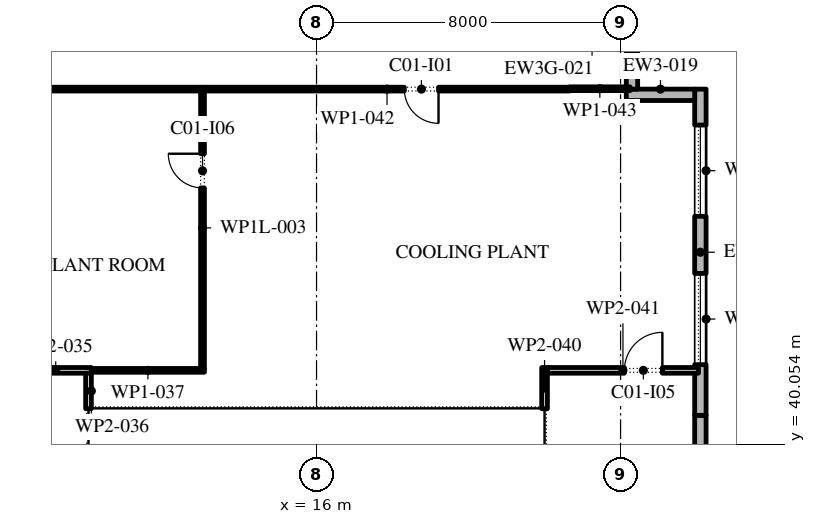
"""IFC4 building model, lengths in metres.
Left out: names, types, materials, properties, quantities, classifications, styles, units other than length and angle.
Written with IfcOpenShell. Run it as: python <this file> out.ifc"""

import sys

from ifc_helpers import new_model, si_unit, direction, frame, frame_2d, origin, place, context, subcontext, project, spatial, polyline, rectangle, outline, extrude, element, fill, save


model = new_model("IFC4")
c1 = context("Model", 3, precision=1e-05, world=origin(), true_north=direction((0.0, 1.0)))
c2 = subcontext(c1, "Body", "Model", "MODEL_VIEW")
j1 = project(units=[si_unit("LENGTHUNIT", "METRE"), si_unit("PLANEANGLEUNIT", "RADIAN")], contexts=[c1])
p1 = place(None, origin())
s1 = spatial("IfcSite", under=j1, at=p1, CompositionType="ELEMENT")
p2 = place(p1, origin())
s2 = spatial("IfcBuilding", under=s1, at=p2, CompositionType="ELEMENT")
p3 = place(p2, frame((0.0, 0.0, 369.0)))
s3 = spatial("IfcBuildingStorey", under=s2, at=p3, CompositionType="ELEMENT", Elevation=369.0)
p4 = place(p3, frame((26.1, 32.233, 0.0), z_axis=(0.0, 0.0, 1.0), x_axis=(0.0, 1.0, 0.0)))
e1 = element("IfcWall", 1, at=p4, inside=s3, PredefinedType="STANDARD", context=c2, shape_type="SweptSolid", body=[
    extrude(rectangle(XDim=8.583, YDim=0.3, at=frame_2d((4.292, 0.0))), origin(), (0.0, 0.0, 1.0), 4.0),
])
p5 = place(p4, frame((0.946, 0.0, 0.8)))
e2 = element("IfcOpeningElement", 2, at=p5, cuts=e1, PredefinedType="OPENING", context=c2, shape_type="SweptSolid", body=[
    extrude(outline(polyline([(0.0, 0.0), (2.4, 0.0), (2.4, 1.25), (2.377, 1.488), (2.31, 1.717), (2.2, 1.929), (2.051, 2.116), (1.87, 2.272), (1.663, 2.391), (1.437, 2.468), (1.2, 2.5), (0.963, 2.468), (0.737, 2.391), (0.53, 2.272), (0.349, 2.116), (0.2, 1.929), (0.09, 1.717), (0.023, 1.488), (0.0, 1.25), (0.0, 0.0)])), frame((0.0, 0.16, 0.0), z_axis=(0.0, -1.0, 0.0), x_axis=(1.0, 0.0, 0.0)), (0.0, 0.0, 1.0), 0.32),
])
p6 = place(p4, frame((5.238, 0.0, 0.8)))
e3 = element("IfcOpeningElement", 3, at=p6, cuts=e1, PredefinedType="OPENING", context=c2, shape_type="SweptSolid", body=[
    extrude(outline(polyline([(0.0, 0.0), (2.4, 0.0), (2.4, 1.25), (2.377, 1.488), (2.31, 1.717), (2.2, 1.929), (2.051, 2.116), (1.87, 2.272), (1.663, 2.391), (1.437, 2.468), (1.2, 2.5), (0.963, 2.468), (0.737, 2.391), (0.53, 2.272), (0.349, 2.116), (0.2, 1.929), (0.09, 1.717), (0.023, 1.488), (0.0, 1.25), (0.0, 0.0)])), frame((0.0, 0.16, 0.0), z_axis=(0.0, -1.0, 0.0), x_axis=(1.0, 0.0, 0.0)), (0.0, 0.0, 1.0), 0.32),
])
p7 = place(p3, frame((26.1, 40.817, 0.0), z_axis=(0.0, 0.0, 1.0), x_axis=(0.0, 1.0, 0.0)))
e4 = element("IfcWall", 4, at=p7, inside=s3, PredefinedType="STANDARD", context=c2, shape_type="SweptSolid", body=[
    extrude(rectangle(XDim=8.583, YDim=0.3, at=frame_2d((4.292, 0.0))), origin(), (0.0, 0.0, 1.0), 4.0),
])
p8 = place(p7, frame((1.333, 0.0, 0.8)))
e5 = element("IfcOpeningElement", 5, at=p8, cuts=e4, PredefinedType="OPENING", context=c2, shape_type="SweptSolid", body=[
    extrude(outline(polyline([(0.0, 0.0), (2.4, 0.0), (2.4, 1.25), (2.377, 1.488), (2.31, 1.717), (2.2, 1.929), (2.051, 2.116), (1.87, 2.272), (1.663, 2.391), (1.437, 2.468), (1.2, 2.5), (0.963, 2.468), (0.737, 2.391), (0.53, 2.272), (0.349, 2.116), (0.2, 1.929), (0.09, 1.717), (0.023, 1.488), (0.0, 1.25), (0.0, 0.0)])), frame((0.0, 0.16, 0.0), z_axis=(0.0, -1.0, 0.0), x_axis=(1.0, 0.0, 0.0)), (0.0, 0.0, 1.0), 0.32),
])
p9 = place(p7, frame((5.238, 0.0, 0.8)))
e6 = element("IfcOpeningElement", 6, at=p9, cuts=e4, PredefinedType="OPENING", context=c2, shape_type="SweptSolid", body=[
    extrude(outline(polyline([(0.0, 0.0), (2.4, 0.0), (2.4, 1.25), (2.377, 1.488), (2.31, 1.717), (2.2, 1.929), (2.051, 2.116), (1.87, 2.272), (1.663, 2.391), (1.437, 2.468), (1.2, 2.5), (0.963, 2.468), (0.737, 2.391), (0.53, 2.272), (0.349, 2.116), (0.2, 1.929), (0.09, 1.717), (0.023, 1.488), (0.0, 1.25), (0.0, 0.0)])), frame((0.0, 0.16, 0.0), z_axis=(0.0, -1.0, 0.0), x_axis=(1.0, 0.0, 0.0)), (0.0, 0.0, 1.0), 0.32),
])
p10 = place(p3, frame((25.95, 49.25, 0.0), z_axis=(0.0, 0.0, 1.0), x_axis=(-1.0, 0.0, 0.0)))
e7 = element("IfcWall", 7, at=p10, inside=s3, PredefinedType="STANDARD", context=c2, shape_type="SweptSolid", body=[
    extrude(rectangle(XDim=1.8, YDim=0.3, at=frame_2d((0.9, 0.0))), origin(), (0.0, 0.0, 1.0), 4.0),
])
p11 = place(p3, frame((24.3, 49.4, 0.0), z_axis=(0.0, 0.0, 1.0), x_axis=(0.0, 1.0, 0.0)))
e8 = element("IfcWall", 8, at=p11, inside=s3, PredefinedType="STANDARD", context=c2, shape_type="SweptSolid", body=[
    extrude(outline(polyline([(0.0, 0.0), (1.8, 0.0), (1.8, 5.913), (1.239, 6.291), (1.228, 6.298), (1.228, 4.0), (0.0, 4.0), (0.0, 0.0)])), frame((0.0, 0.15, 0.0), z_axis=(0.0, -1.0, 0.0), x_axis=(1.0, 0.0, 0.0)), (0.0, 0.0, 1.0), 0.3),
])
p12 = place(p3, frame((8.2, 42.0, 0.0), z_axis=(0.0, 0.0, 1.0), x_axis=(1.0, 0.0, 0.0)))
e9 = element("IfcWall", 9, at=p12, inside=s3, PredefinedType="PARTITIONING", context=c2, shape_type="SweptSolid", body=[
    extrude(rectangle(XDim=1.875, YDim=0.15, at=frame_2d((0.938, 0.0))), origin(), (0.0, 0.0, 1.0), 4.0),
])
p13 = place(p3, frame((10.0, 41.925, 0.0), z_axis=(0.0, 0.0, 1.0), x_axis=(0.0, -1.0, 0.0)))
e10 = element("IfcWall", 10, at=p13, inside=s3, PredefinedType="PARTITIONING", context=c2, shape_type="SweptSolid", body=[
    extrude(rectangle(XDim=0.935, YDim=0.15, at=frame_2d((0.468, 0.0))), origin(), (0.0, 0.0, 1.0), 4.0),
])
p14 = place(p3, frame((10.075, 42.0, 0.0), z_axis=(0.0, 0.0, 1.0), x_axis=(1.0, 0.0, 0.0)))
e11 = element("IfcWall", 11, at=p14, inside=s3, PredefinedType="PARTITIONING", context=c2, shape_type="SweptSolid", body=[
    extrude(rectangle(XDim=2.975, YDim=0.1, at=frame_2d((1.488, 0.0))), origin(), (0.0, 0.0, 1.0), 4.0),
])
p15 = place(p3, frame((13.0, 42.05, 0.0), z_axis=(0.0, 0.0, 1.0), x_axis=(0.0, 1.0, 0.0)))
e12 = element("IfcWall", 12, at=p15, inside=s3, PredefinedType="PARTITIONING", context=c2, shape_type="SweptSolid", body=[
    extrude(rectangle(XDim=7.4, YDim=0.1, at=frame_2d((3.7, 0.0))), origin(), (0.0, 0.0, 1.0), 3.02),
])
p16 = place(p15, frame((4.75, 0.0, 0.0)))
e13 = element("IfcOpeningElement", 13, at=p16, cuts=e12, PredefinedType="OPENING", context=c2, shape_type="SweptSolid", body=[
    extrude(rectangle(XDim=0.9, YDim=2.1, at=frame_2d((0.45, 1.05))), frame((0.0, 0.06, 0.0), z_axis=(0.0, -1.0, 0.0), x_axis=(1.0, 0.0, 0.0)), (0.0, 0.0, 1.0), 0.12),
])
p17 = place(p3, frame((12.95, 49.4, 0.0), z_axis=(0.0, 0.0, 1.0), x_axis=(-1.0, 0.0, 0.0)))
e14 = element("IfcWall", 14, at=p17, inside=s3, PredefinedType="PARTITIONING", context=c2, shape_type="SweptSolid", body=[
    extrude(rectangle(XDim=10.9, YDim=0.1, at=frame_2d((5.45, 0.0))), origin(), (0.0, 0.0, 1.0), 4.0),
])
p18 = place(p3, frame((22.0, 40.99, 0.0), z_axis=(0.0, 0.0, 1.0), x_axis=(0.0, 1.0, 0.0)))
e15 = element("IfcWall", 15, at=p18, inside=s3, PredefinedType="PARTITIONING", context=c2, shape_type="SweptSolid", body=[
    extrude(rectangle(XDim=1.085, YDim=0.15, at=frame_2d((0.542, 0.0))), origin(), (0.0, 0.0, 1.0), 4.0),
])
p19 = place(p3, frame((22.075, 42.0, 0.0), z_axis=(0.0, 0.0, 1.0), x_axis=(1.0, 0.0, 0.0)))
e16 = element("IfcWall", 16, at=p19, inside=s3, PredefinedType="PARTITIONING", context=c2, shape_type="SweptSolid", body=[
    extrude(rectangle(XDim=3.975, YDim=0.15, at=frame_2d((1.988, 0.0))), origin(), (0.0, 0.0, 1.0), 4.0),
])
p20 = place(p19, frame((2.025, 0.0, 0.0)))
e17 = element("IfcOpeningElement", 17, at=p20, cuts=e16, PredefinedType="OPENING", context=c2, shape_type="SweptSolid", body=[
    extrude(rectangle(XDim=1.0, YDim=2.1, at=frame_2d((0.5, 1.05))), frame((0.0, 0.085, 0.0), z_axis=(0.0, -1.0, 0.0), x_axis=(1.0, 0.0, 0.0)), (0.0, 0.0, 1.0), 0.17),
])
p21 = place(p3, frame((22.66, 49.4, 0.0), z_axis=(0.0, 0.0, 1.0), x_axis=(-1.0, 0.0, 0.0)))
e18 = element("IfcWall", 18, at=p21, inside=s3, PredefinedType="PARTITIONING", context=c2, shape_type="SweptSolid", body=[
    extrude(rectangle(XDim=9.61, YDim=0.1, at=frame_2d((4.805, 0.0))), origin(), (0.0, 0.0, 1.0), 4.0),
])
p22 = place(p21, frame((3.45, 0.0, 0.0)))
e19 = element("IfcOpeningElement", 19, at=p22, cuts=e18, PredefinedType="OPENING", context=c2, shape_type="SweptSolid", body=[
    extrude(rectangle(XDim=0.9, YDim=2.1, at=frame_2d((0.45, 1.05))), frame((0.0, 0.06, 0.0), z_axis=(0.0, -1.0, 0.0), x_axis=(1.0, 0.0, 0.0)), (0.0, 0.0, 1.0), 0.12),
])
p23 = place(p3, frame((24.25, 49.41, 0.0), z_axis=(0.0, 0.0, 1.0), x_axis=(-1.0, 0.0, 0.0)))
e20 = element("IfcWall", 20, at=p23, inside=s3, PredefinedType="PARTITIONING", context=c2, shape_type="SweptSolid", body=[
    extrude(rectangle(XDim=1.59, YDim=0.1, at=frame_2d((0.795, 0.0))), origin(), (0.0, 0.0, 1.0), 4.0),
])
p24 = place(p8, origin())
e21 = element("IfcWindow", 21, at=p24, inside=s3, PartitioningType="DOUBLE_PANEL_VERTICAL", PredefinedType="WINDOW", context=c2, shape_type="SweptSolid", body=[
    extrude(outline(polyline([(0.0, 0.0), (2.4, 0.0), (2.4, 1.25), (2.377, 1.488), (2.31, 1.717), (2.2, 1.929), (2.051, 2.116), (1.87, 2.272), (1.663, 2.391), (1.437, 2.468), (1.2, 2.5), (0.963, 2.468), (0.737, 2.391), (0.53, 2.272), (0.349, 2.116), (0.2, 1.929), (0.09, 1.717), (0.023, 1.488), (0.0, 1.25), (0.0, 0.0)])), frame((0.0, 0.03, 0.0), z_axis=(0.0, -1.0, 0.0), x_axis=(1.0, 0.0, 0.0)), (0.0, 0.0, 1.0), 0.06),
])
fill(e5, e21)
p25 = place(p9, origin())
e22 = element("IfcWindow", 22, at=p25, inside=s3, PartitioningType="DOUBLE_PANEL_VERTICAL", PredefinedType="WINDOW", context=c2, shape_type="SweptSolid", body=[
    extrude(outline(polyline([(0.0, 0.0), (2.4, 0.0), (2.4, 1.25), (2.377, 1.488), (2.31, 1.717), (2.2, 1.929), (2.051, 2.116), (1.87, 2.272), (1.663, 2.391), (1.437, 2.468), (1.2, 2.5), (0.963, 2.468), (0.737, 2.391), (0.53, 2.272), (0.349, 2.116), (0.2, 1.929), (0.09, 1.717), (0.023, 1.488), (0.0, 1.25), (0.0, 0.0)])), frame((0.0, 0.03, 0.0), z_axis=(0.0, -1.0, 0.0), x_axis=(1.0, 0.0, 0.0)), (0.0, 0.0, 1.0), 0.06),
])
fill(e6, e22)
p26 = place(p22, origin())
e23 = element("IfcDoor", 23, at=p26, inside=s3, OperationType="SINGLE_SWING_RIGHT", PredefinedType="DOOR", context=c2, shape_type="SweptSolid", body=[
    extrude(rectangle(XDim=0.9, YDim=2.1, at=frame_2d((0.45, 1.05))), frame((0.0, 0.025, 0.0), z_axis=(0.0, -1.0, 0.0), x_axis=(1.0, 0.0, 0.0)), (0.0, 0.0, 1.0), 0.05),
])
fill(e19, e23)
p27 = place(p20, origin())
e24 = element("IfcDoor", 24, at=p27, inside=s3, OperationType="SINGLE_SWING_LEFT", PredefinedType="DOOR", context=c2, shape_type="SweptSolid", body=[
    extrude(rectangle(XDim=1.0, YDim=2.1, at=frame_2d((0.5, 1.05))), frame((0.0, 0.025, 0.0), z_axis=(0.0, -1.0, 0.0), x_axis=(1.0, 0.0, 0.0)), (0.0, 0.0, 1.0), 0.05),
])
fill(e17, e24)
p28 = place(p16, origin())
e25 = element("IfcDoor", 25, at=p28, inside=s3, OperationType="SINGLE_SWING_LEFT", PredefinedType="DOOR", context=c2, shape_type="SweptSolid", body=[
    extrude(rectangle(XDim=0.9, YDim=2.1, at=frame_2d((0.45, 1.05))), frame((0.0, 0.025, 0.0), z_axis=(0.0, -1.0, 0.0), x_axis=(1.0, 0.0, 0.0)), (0.0, 0.0, 1.0), 0.05),
])
fill(e13, e25)
save(model, sys.argv[1])
